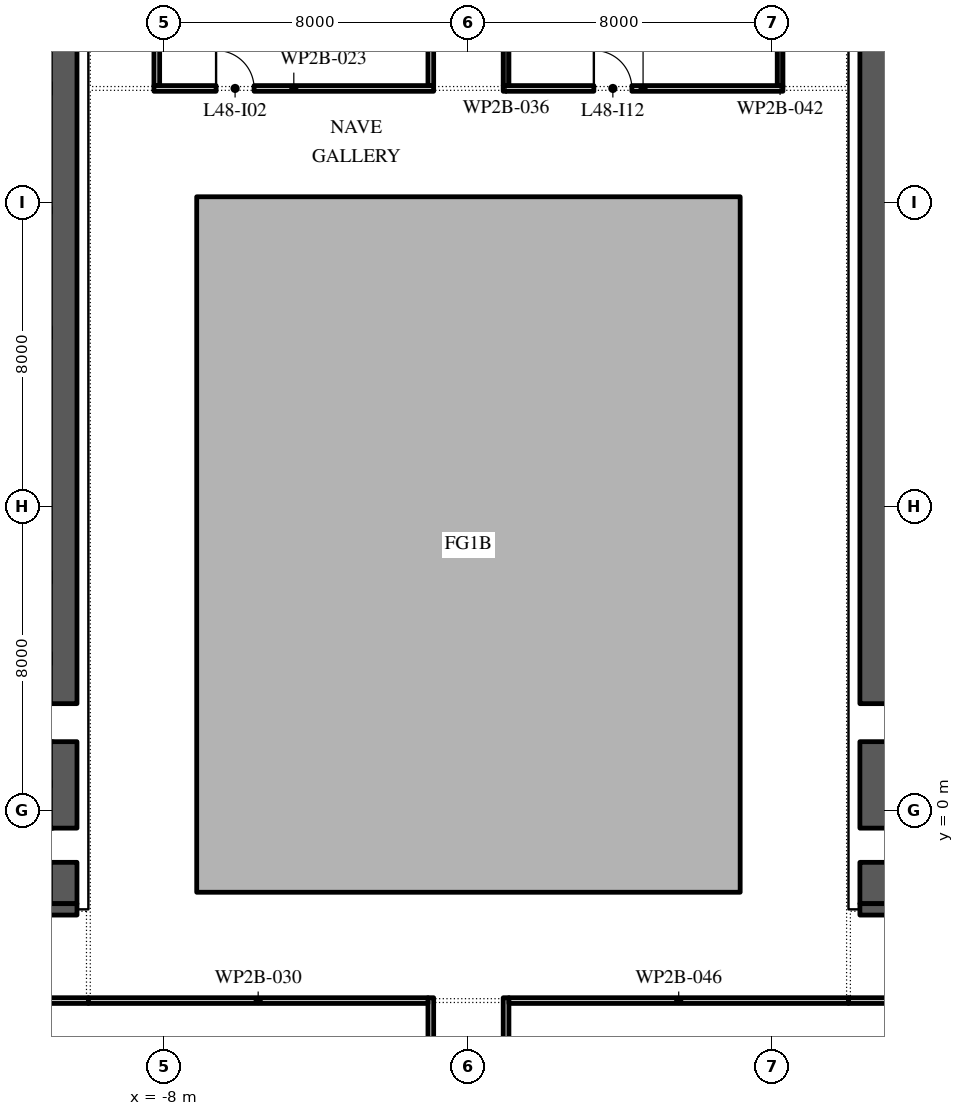
"""IFC4 building model, lengths in metres.
Left out: names, types, materials, properties, quantities, classifications, styles, units other than length and angle.
Written with IfcOpenShell. Run it as: python <this file> out.ifc"""

import sys

from ifc_helpers import new_model, si_unit, direction, frame, frame_2d, origin, place, context, subcontext, project, spatial, polyline, rectangle, outline, extrude, element, fill, save


model = new_model("IFC4")
c1 = context("Model", 3, precision=1e-05, world=origin(), true_north=direction((0.0, 1.0)))
c2 = subcontext(c1, "Body", "Model", "MODEL_VIEW")
j1 = project(units=[si_unit("LENGTHUNIT", "METRE"), si_unit("PLANEANGLEUNIT", "RADIAN")], contexts=[c1])
p1 = place(None, origin())
s1 = spatial("IfcSite", under=j1, at=p1, CompositionType="ELEMENT")
p2 = place(p1, origin())
s2 = spatial("IfcBuilding", under=s1, at=p2, CompositionType="ELEMENT")
p3 = place(p2, frame((0.0, 0.0, 217.8)))
s3 = spatial("IfcBuildingStorey", under=s2, at=p3, CompositionType="ELEMENT", Elevation=217.8)
p4 = place(p3, origin())
e1 = element("IfcWall", 1, at=p4, inside=s3, PredefinedType="STANDARD", context=c2, shape_type="SweptSolid", body=[
    extrude(outline(polyline([(-7.15, -2.15), (7.15, -2.15), (7.15, 16.15), (-7.15, 16.15), (-7.15, -2.15)]), holes=[polyline([(-7.0, -2.0), (-7.0, 16.0), (7.0, 16.0), (7.0, -2.0), (-7.0, -2.0)])]), origin(), (0.0, 0.0, 1.0), 3.95),
])
p5 = place(p3, frame((-10.65, -2.45, 0.0), z_axis=(0.0, 0.0, 1.0), x_axis=(0.0, 1.0, 0.0)))
e2 = element("IfcWall", 2, at=p5, inside=s3, PredefinedType="SHEAR", context=c2, shape_type="SweptSolid", body=[
    extrude(rectangle(XDim=27.9, YDim=0.7, at=frame_2d((13.95, 0.0))), origin(), (0.0, 0.0, 1.0), 3.95),
])
p6 = place(p5, frame((23.65, 0.0, 0.0)))
e3 = element("IfcOpeningElement", 3, at=p6, cuts=e2, PredefinedType="OPENING", context=c2, shape_type="SweptSolid", body=[
    extrude(rectangle(XDim=2.4, YDim=2.1, at=frame_2d((1.2, 1.05))), frame((0.0, 0.36, 0.0), z_axis=(0.0, -1.0, 0.0), x_axis=(1.0, 0.0, 0.0)), (0.0, 0.0, 1.0), 0.72),
])
p7 = place(p5, frame((1.087, 0.0, 0.0)))
e4 = element("IfcOpeningElement", 4, at=p7, cuts=e2, PredefinedType="OPENING", context=c2, shape_type="SweptSolid", body=[
    extrude(rectangle(XDim=0.9, YDim=2.1, at=frame_2d((0.45, 1.05))), frame((0.0, 0.36, 0.0), z_axis=(0.0, -1.0, 0.0), x_axis=(1.0, 0.0, 0.0)), (0.0, 0.0, 1.0), 0.72),
])
p8 = place(p5, frame((4.262, 0.0, 0.0)))
e5 = element("IfcOpeningElement", 5, at=p8, cuts=e2, PredefinedType="OPENING", context=c2, shape_type="SweptSolid", body=[
    extrude(rectangle(XDim=1.0, YDim=2.1, at=frame_2d((0.5, 1.05))), frame((0.0, 0.36, 0.0), z_axis=(0.0, -1.0, 0.0), x_axis=(1.0, 0.0, 0.0)), (0.0, 0.0, 1.0), 0.72),
])
p9 = place(p3, frame((-21.7, -2.6, 0.0), z_axis=(0.0, 0.0, 1.0), x_axis=(1.0, 0.0, 0.0)))
e6 = element("IfcWall", 6, at=p9, inside=s3, PredefinedType="SHEAR", context=c2, shape_type="SweptSolid", body=[
    extrude(rectangle(XDim=11.4, YDim=0.3, at=frame_2d((5.7, 0.0))), origin(), (0.0, 0.0, 1.0), 3.95),
])
p10 = place(p3, frame((10.65, -2.45, 0.0), z_axis=(0.0, 0.0, 1.0), x_axis=(0.0, 1.0, 0.0)))
e7 = element("IfcWall", 7, at=p10, inside=s3, PredefinedType="SHEAR", context=c2, shape_type="SweptSolid", body=[
    extrude(rectangle(XDim=27.9, YDim=0.7, at=frame_2d((13.95, 0.0))), origin(), (0.0, 0.0, 1.0), 3.95),
])
p11 = place(p10, frame((23.65, 0.0, 0.0)))
e8 = element("IfcOpeningElement", 8, at=p11, cuts=e7, PredefinedType="OPENING", context=c2, shape_type="SweptSolid", body=[
    extrude(rectangle(XDim=2.4, YDim=2.1, at=frame_2d((1.2, 1.05))), frame((0.0, 0.36, 0.0), z_axis=(0.0, -1.0, 0.0), x_axis=(1.0, 0.0, 0.0)), (0.0, 0.0, 1.0), 0.72),
])
p12 = place(p10, frame((1.087, 0.0, 0.0)))
e9 = element("IfcOpeningElement", 9, at=p12, cuts=e7, PredefinedType="OPENING", context=c2, shape_type="SweptSolid", body=[
    extrude(rectangle(XDim=0.9, YDim=2.1, at=frame_2d((0.45, 1.05))), frame((0.0, 0.36, 0.0), z_axis=(0.0, -1.0, 0.0), x_axis=(1.0, 0.0, 0.0)), (0.0, 0.0, 1.0), 0.72),
])
p13 = place(p10, frame((4.262, 0.0, 0.0)))
e10 = element("IfcOpeningElement", 10, at=p13, cuts=e7, PredefinedType="OPENING", context=c2, shape_type="SweptSolid", body=[
    extrude(rectangle(XDim=1.0, YDim=2.1, at=frame_2d((0.5, 1.05))), frame((0.0, 0.36, 0.0), z_axis=(0.0, -1.0, 0.0), x_axis=(1.0, 0.0, 0.0)), (0.0, 0.0, 1.0), 0.72),
])
p14 = place(p3, frame((10.3, -2.6, 0.0), z_axis=(0.0, 0.0, 1.0), x_axis=(1.0, 0.0, 0.0)))
e11 = element("IfcWall", 11, at=p14, inside=s3, PredefinedType="SHEAR", context=c2, shape_type="SweptSolid", body=[
    extrude(rectangle(XDim=11.4, YDim=0.3, at=frame_2d((5.7, 0.0))), origin(), (0.0, 0.0, 1.0), 3.95),
])
p15 = place(p3, frame((-10.0, -5.0, 0.0), z_axis=(0.0, 0.0, 1.0), x_axis=(-1.0, 0.0, 0.0)))
e12 = element("IfcWall", 12, at=p15, inside=s3, PredefinedType="PARTITIONING", context=c2, shape_type="SweptSolid", body=[
    extrude(rectangle(XDim=13.715, YDim=0.15, at=frame_2d((6.857, 0.0))), origin(), (0.0, 0.0, 1.0), 3.95),
])
p16 = place(p15, frame((3.64, 0.0, 0.0)))
e13 = element("IfcOpeningElement", 13, at=p16, cuts=e12, PredefinedType="OPENING", context=c2, shape_type="SweptSolid", body=[
    extrude(rectangle(XDim=1.0, YDim=2.1, at=frame_2d((0.5, 1.05))), frame((0.0, 0.085, 0.0), z_axis=(0.0, -1.0, 0.0), x_axis=(1.0, 0.0, 0.0)), (0.0, 0.0, 1.0), 0.17),
])
p17 = place(p3, frame((-8.275, 19.0, 0.0), z_axis=(0.0, 0.0, 1.0), x_axis=(1.0, 0.0, 0.0)))
e14 = element("IfcWall", 14, at=p17, inside=s3, PredefinedType="PARTITIONING", context=c2, shape_type="SweptSolid", body=[
    extrude(rectangle(XDim=7.36, YDim=0.15, at=frame_2d((3.68, 0.0))), origin(), (0.0, 0.0, 1.0), 3.95),
])
p18 = place(p17, frame((1.635, 0.0, 0.0)))
e15 = element("IfcOpeningElement", 15, at=p18, cuts=e14, PredefinedType="OPENING", context=c2, shape_type="SweptSolid", body=[
    extrude(rectangle(XDim=1.0, YDim=2.1, at=frame_2d((0.5, 1.05))), frame((0.0, 0.085, 0.0), z_axis=(0.0, -1.0, 0.0), x_axis=(1.0, 0.0, 0.0)), (0.0, 0.0, 1.0), 0.17),
])
p19 = place(p3, frame((-8.2, 22.31, 0.0), z_axis=(0.0, 0.0, 1.0), x_axis=(0.0, -1.0, 0.0)))
e16 = element("IfcWall", 16, at=p19, inside=s3, PredefinedType="PARTITIONING", context=c2, shape_type="SweptSolid", body=[
    extrude(rectangle(XDim=3.235, YDim=0.15, at=frame_2d((1.618, 0.0))), origin(), (0.0, 0.0, 1.0), 3.95),
])
p20 = place(p3, frame((-0.99, -11.17, 0.0), z_axis=(0.0, 0.0, 1.0), x_axis=(0.0, 1.0, 0.0)))
e17 = element("IfcWall", 17, at=p20, inside=s3, PredefinedType="PARTITIONING", context=c2, shape_type="SweptSolid", body=[
    extrude(rectangle(XDim=6.245, YDim=0.15, at=frame_2d((3.123, 0.0))), origin(), (0.0, 0.0, 1.0), 3.95),
])
p21 = place(p3, frame((-1.065, -5.0, 0.0), z_axis=(0.0, 0.0, 1.0), x_axis=(-1.0, 0.0, 0.0)))
e18 = element("IfcWall", 18, at=p21, inside=s3, PredefinedType="PARTITIONING", context=c2, shape_type="SweptSolid", body=[
    extrude(rectangle(XDim=8.935, YDim=0.15, at=frame_2d((4.468, 0.0))), origin(), (0.0, 0.0, 1.0), 3.95),
])
p22 = place(p3, frame((-0.99, 19.075, 0.0), z_axis=(0.0, 0.0, 1.0), x_axis=(0.0, 1.0, 0.0)))
e19 = element("IfcWall", 19, at=p22, inside=s3, PredefinedType="PARTITIONING", context=c2, shape_type="SweptSolid", body=[
    extrude(rectangle(XDim=3.185, YDim=0.15, at=frame_2d((1.593, 0.0))), origin(), (0.0, 0.0, 1.0), 3.95),
])
p23 = place(p3, frame((0.99, -4.925, 0.0), z_axis=(0.0, 0.0, 1.0), x_axis=(0.0, -1.0, 0.0)))
e20 = element("IfcWall", 20, at=p23, inside=s3, PredefinedType="PARTITIONING", context=c2, shape_type="SweptSolid", body=[
    extrude(rectangle(XDim=11.371, YDim=0.15, at=frame_2d((5.686, 0.0))), origin(), (0.0, 0.0, 1.0), 3.95),
])
p24 = place(p23, frame((2.945, 0.0, 0.0)))
e21 = element("IfcOpeningElement", 21, at=p24, cuts=e20, PredefinedType="OPENING", context=c2, shape_type="SweptSolid", body=[
    extrude(rectangle(XDim=1.0, YDim=2.1, at=frame_2d((0.5, 1.05))), frame((0.0, 0.085, 0.0), z_axis=(0.0, -1.0, 0.0), x_axis=(1.0, 0.0, 0.0)), (0.0, 0.0, 1.0), 0.17),
])
p25 = place(p3, frame((0.915, 19.0, 0.0), z_axis=(0.0, 0.0, 1.0), x_axis=(1.0, 0.0, 0.0)))
e22 = element("IfcWall", 22, at=p25, inside=s3, PredefinedType="PARTITIONING", context=c2, shape_type="SweptSolid", body=[
    extrude(rectangle(XDim=7.36, YDim=0.15, at=frame_2d((3.68, 0.0))), origin(), (0.0, 0.0, 1.0), 3.95),
])
p26 = place(p25, frame((2.385, 0.0, 0.0)))
e23 = element("IfcOpeningElement", 23, at=p26, cuts=e22, PredefinedType="OPENING", context=c2, shape_type="SweptSolid", body=[
    extrude(rectangle(XDim=1.0, YDim=2.1, at=frame_2d((0.5, 1.05))), frame((0.0, 0.085, 0.0), z_axis=(0.0, -1.0, 0.0), x_axis=(1.0, 0.0, 0.0)), (0.0, 0.0, 1.0), 0.17),
])
p27 = place(p3, frame((0.99, 22.31, 0.0), z_axis=(0.0, 0.0, 1.0), x_axis=(0.0, -1.0, 0.0)))
e24 = element("IfcWall", 24, at=p27, inside=s3, PredefinedType="PARTITIONING", context=c2, shape_type="SweptSolid", body=[
    extrude(rectangle(XDim=3.235, YDim=0.15, at=frame_2d((1.618, 0.0))), origin(), (0.0, 0.0, 1.0), 3.95),
])
p28 = place(p3, frame((8.2, 19.075, 0.0), z_axis=(0.0, 0.0, 1.0), x_axis=(0.0, 1.0, 0.0)))
e25 = element("IfcWall", 25, at=p28, inside=s3, PredefinedType="PARTITIONING", context=c2, shape_type="SweptSolid", body=[
    extrude(rectangle(XDim=3.185, YDim=0.15, at=frame_2d((1.593, 0.0))), origin(), (0.0, 0.0, 1.0), 3.95),
])
p29 = place(p3, frame((10.0, -5.0, 0.0), z_axis=(0.0, 0.0, 1.0), x_axis=(-1.0, 0.0, 0.0)))
e26 = element("IfcWall", 26, at=p29, inside=s3, PredefinedType="PARTITIONING", context=c2, shape_type="SweptSolid", body=[
    extrude(rectangle(XDim=8.935, YDim=0.15, at=frame_2d((4.468, 0.0))), origin(), (0.0, 0.0, 1.0), 3.95),
])
p30 = place(p3, frame((14.48, -5.0, 0.0), z_axis=(0.0, 0.0, 1.0), x_axis=(-1.0, 0.0, 0.0)))
e27 = element("IfcWall", 27, at=p30, inside=s3, PredefinedType="PARTITIONING", context=c2, shape_type="SweptSolid", body=[
    extrude(rectangle(XDim=4.48, YDim=0.15, at=frame_2d((2.24, 0.0))), origin(), (0.0, 0.0, 1.0), 3.95),
])
p31 = place(p18, origin())
e28 = element("IfcDoor", 28, at=p31, inside=s3, OperationType="SINGLE_SWING_RIGHT", PredefinedType="DOOR", context=c2, shape_type="SweptSolid", body=[
    extrude(rectangle(XDim=1.0, YDim=2.1, at=frame_2d((0.5, 1.05))), frame((0.0, 0.025, 0.0), z_axis=(0.0, -1.0, 0.0), x_axis=(1.0, 0.0, 0.0)), (0.0, 0.0, 1.0), 0.05),
])
fill(e15, e28)
p32 = place(p26, origin())
e29 = element("IfcDoor", 29, at=p32, inside=s3, OperationType="SINGLE_SWING_RIGHT", PredefinedType="DOOR", context=c2, shape_type="SweptSolid", body=[
    extrude(rectangle(XDim=1.0, YDim=2.1, at=frame_2d((0.5, 1.05))), frame((0.0, 0.025, 0.0), z_axis=(0.0, -1.0, 0.0), x_axis=(1.0, 0.0, 0.0)), (0.0, 0.0, 1.0), 0.05),
])
fill(e23, e29)
save(model, sys.argv[1])
